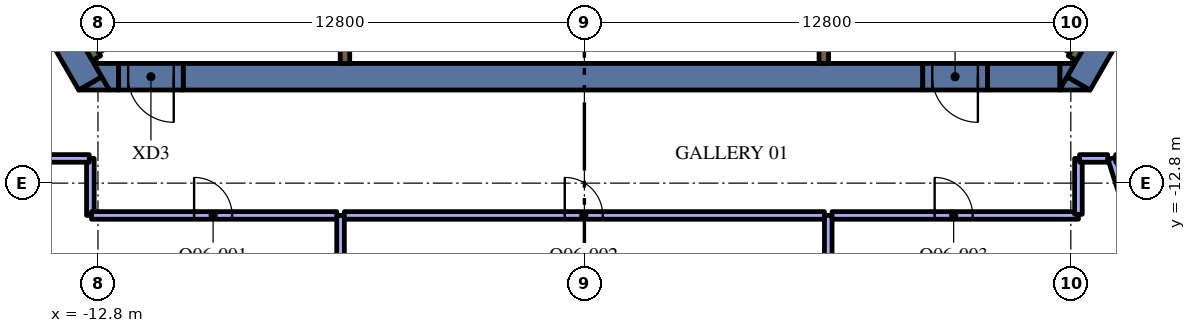
"""IFC4 building model, lengths in metres.
Left out: names, types, materials, properties, quantities, classifications, styles, units other than length and angle.
Written with IfcOpenShell. Run it as: python <this file> out.ifc"""

import sys

from ifc_helpers import new_model, si_unit, direction, frame, frame_2d, origin, place, context, subcontext, project, spatial, polyline, rectangle, outline, extrude, element, fill, save


model = new_model("IFC4")
c1 = context("Model", 3, precision=1e-05, world=origin(), true_north=direction((0.0, 1.0)))
c2 = subcontext(c1, "Body", "Model", "MODEL_VIEW")
j1 = project(units=[si_unit("LENGTHUNIT", "METRE"), si_unit("PLANEANGLEUNIT", "RADIAN")], contexts=[c1])
p1 = place(None, origin())
s1 = spatial("IfcSite", under=j1, at=p1, CompositionType="ELEMENT")
p2 = place(p1, origin())
s2 = spatial("IfcBuilding", under=s1, at=p2, CompositionType="ELEMENT")
p3 = place(p2, frame((0.0, 0.0, 205.8)))
s3 = spatial("IfcBuildingStorey", under=s2, at=p3, CompositionType="ELEMENT", Elevation=205.8)
p4 = place(p3, frame((13.003, -10.179, 0.0), z_axis=(0.0, 0.0, 1.0), x_axis=(0.499972675833, 0.866041178825, 0.0)))
e1 = element("IfcWall", 1, at=p4, inside=s3, PredefinedType="SOLIDWALL", context=c2, shape_type="SweptSolid", body=[
    extrude(rectangle(XDim=3.829, YDim=0.7, at=frame_2d((1.915, 0.0))), origin(), (0.0, 0.0, 1.0), 4.2),
])
p5 = place(p3, origin())
e2 = element("IfcWall", 2, at=p5, inside=s3, PredefinedType="SOLIDWALL", context=c2, shape_type="SweptSolid", body=[
    extrude(outline(polyline([(12.698, -10.005), (13.296, -10.35), (12.5, -10.35), (12.698, -10.005)])), origin(), (0.0, 0.0, 1.0), 4.2),
])
p6 = place(p3, frame((10.604, -10.0, 0.0), z_axis=(0.0, 0.0, 1.0), x_axis=(1.0, 0.0, 0.0)))
e3 = element("IfcWall", 3, at=p6, inside=s3, PredefinedType="SOLIDWALL", context=c2, shape_type="SweptSolid", body=[
    extrude(rectangle(XDim=1.909, YDim=0.7, at=frame_2d((0.955, 0.0))), origin(), (0.0, 0.0, 1.0), 4.2),
])
e4 = element("IfcWall", 4, at=p5, inside=s3, PredefinedType="SOLIDWALL", context=c2, shape_type="SweptSolid", body=[
    extrude(outline(polyline([(12.904, -9.65), (12.516, -10.322), (12.516, -9.65), (12.904, -9.65)])), origin(), (0.0, 0.0, 1.0), 4.2),
])
p7 = place(p3, frame((-14.917, -6.863, 0.0), z_axis=(0.0, 0.0, 1.0), x_axis=(0.499972675833, -0.866041178825, 0.0)))
e5 = element("IfcWall", 5, at=p7, inside=s3, PredefinedType="SOLIDWALL", context=c2, shape_type="SweptSolid", body=[
    extrude(rectangle(XDim=3.829, YDim=0.7, at=frame_2d((1.915, 0.0))), origin(), (0.0, 0.0, 1.0), 4.2),
])
e6 = element("IfcWall", 6, at=p5, inside=s3, PredefinedType="SOLIDWALL", context=c2, shape_type="SweptSolid", body=[
    extrude(outline(polyline([(-12.5, -10.35), (-13.296, -10.35), (-12.698, -10.005), (-12.5, -10.35)])), origin(), (0.0, 0.0, 1.0), 4.2),
])
e7 = element("IfcWall", 7, at=p5, inside=s3, PredefinedType="SOLIDWALL", context=c2, shape_type="SweptSolid", body=[
    extrude(outline(polyline([(-12.257, -10.35), (-12.5, -10.35), (-12.904, -9.65), (-12.257, -9.65), (-12.257, -10.35)])), origin(), (0.0, 0.0, 1.0), 4.2),
])
p8 = place(p3, frame((-10.556, -10.0, 0.0), z_axis=(0.0, 0.0, 1.0), x_axis=(1.0, 0.0, 0.0)))
e8 = element("IfcWall", 8, at=p8, inside=s3, PredefinedType="SOLIDWALL", context=c2, shape_type="SweptSolid", body=[
    extrude(rectangle(XDim=19.461, YDim=0.7, at=frame_2d((9.73, 0.0))), origin(), (0.0, 0.0, 1.0), 4.2),
])
p9 = place(p3, frame((12.84, -9.511, 0.0), z_axis=(0.0, 0.0, 1.0), x_axis=(0.500048121057, 0.865997619297, 0.0)))
e9 = element("IfcWall", 9, at=p9, inside=s3, PredefinedType="SOLIDWALL", context=c2, shape_type="SweptSolid", body=[
    extrude(rectangle(XDim=3.634, YDim=0.25, at=frame_2d((1.817, 0.0))), origin(), (0.0, 0.0, 1.0), 4.2),
])
p10 = place(p3, frame((12.84, -9.261, 0.0), z_axis=(0.0, 0.0, 1.0), x_axis=(-0.866013990052, 0.500019768644, 0.0)))
e10 = element("IfcWall", 10, at=p10, inside=s3, PredefinedType="SOLIDWALL", context=c2, shape_type="SweptSolid", body=[
    extrude(rectangle(XDim=6.8, YDim=0.25, at=frame_2d((3.4, 0.0))), origin(), (0.0, 0.0, 1.0), 4.2),
])
p11 = place(p3, frame((-12.84, -9.511, 0.0), z_axis=(0.0, 0.0, 1.0), x_axis=(-0.500048121057, 0.865997619297, 0.0)))
e11 = element("IfcWall", 11, at=p11, inside=s3, PredefinedType="SOLIDWALL", context=c2, shape_type="SweptSolid", body=[
    extrude(rectangle(XDim=3.634, YDim=0.25, at=frame_2d((1.817, 0.0))), origin(), (0.0, 0.0, 1.0), 4.2),
])
p12 = place(p3, frame((-12.84, -9.261, 0.0), z_axis=(0.0, 0.0, 1.0), x_axis=(0.866016039709, 0.500016218704, 0.0)))
e12 = element("IfcWall", 12, at=p12, inside=s3, PredefinedType="SOLIDWALL", context=c2, shape_type="SweptSolid", body=[
    extrude(rectangle(XDim=7.05, YDim=0.25, at=frame_2d((3.525, 0.0))), origin(), (0.0, 0.0, 1.0), 4.2),
])
p13 = place(p3, frame((-6.3, -9.052, 0.0), z_axis=(0.0, 0.0, 1.0), x_axis=(0.0, -1.0, 0.0)))
e13 = element("IfcWall", 13, at=p13, inside=s3, PredefinedType="SOLIDWALL", context=c2, shape_type="SweptSolid", body=[
    extrude(rectangle(XDim=0.598, YDim=0.25, at=frame_2d((0.299, 0.0))), origin(), (0.0, 0.0, 1.0), 4.2),
])
p14 = place(p3, frame((6.3, -9.65, 0.0), z_axis=(0.0, 0.0, 1.0), x_axis=(0.0, 1.0, 0.0)))
e14 = element("IfcWall", 14, at=p14, inside=s3, PredefinedType="SOLIDWALL", context=c2, shape_type="SweptSolid", body=[
    extrude(rectangle(XDim=1.008, YDim=0.25, at=frame_2d((0.504, 0.0))), origin(), (0.0, 0.0, 1.0), 4.2),
])
p15 = place(p3, frame((10.604, -10.0, 0.0), z_axis=(0.0, 0.0, 1.0), x_axis=(-1.0, 0.0, 0.0)))
e15 = element("IfcWall", 15, at=p15, inside=s3, PredefinedType="SOLIDWALL", context=c2, shape_type="SweptSolid", body=[
    extrude(rectangle(XDim=1.7, YDim=0.7, at=frame_2d((0.85, 0.0))), origin(), (0.0, 0.0, 1.0), 4.2),
])
p16 = place(p15, frame((0.25, 0.0, 0.0)))
e16 = element("IfcOpeningElement", 16, at=p16, cuts=e15, PredefinedType="OPENING", context=c2, shape_type="SweptSolid", body=[
    extrude(rectangle(XDim=1.2, YDim=2.1, at=frame_2d((0.6, 1.05))), frame((0.0, 0.36, 0.0), z_axis=(0.0, -1.0, 0.0), x_axis=(1.0, 0.0, 0.0)), (0.0, 0.0, 1.0), 0.72),
])
p17 = place(p3, frame((-10.556, -10.0, 0.0), z_axis=(0.0, 0.0, 1.0), x_axis=(-1.0, 0.0, 0.0)))
e17 = element("IfcWall", 17, at=p17, inside=s3, PredefinedType="SOLIDWALL", context=c2, shape_type="SweptSolid", body=[
    extrude(rectangle(XDim=1.7, YDim=0.7, at=frame_2d((0.85, 0.0))), origin(), (0.0, 0.0, 1.0), 4.2),
])
p18 = place(p17, frame((0.25, 0.0, 0.0)))
e18 = element("IfcOpeningElement", 18, at=p18, cuts=e17, PredefinedType="OPENING", context=c2, shape_type="SweptSolid", body=[
    extrude(rectangle(XDim=1.2, YDim=2.1, at=frame_2d((0.6, 1.05))), frame((0.0, 0.36, 0.0), z_axis=(0.0, -1.0, 0.0), x_axis=(1.0, 0.0, 0.0)), (0.0, 0.0, 1.0), 0.72),
])
p19 = place(p3, frame((-6.417, -13.65, 0.0), z_axis=(0.0, 0.0, 1.0), x_axis=(0.0, -1.0, 0.0)))
e19 = element("IfcWall", 19, at=p19, inside=s3, PredefinedType="PARTITIONING", context=c2, shape_type="SweptSolid", body=[
    extrude(rectangle(XDim=5.247, YDim=0.2, at=frame_2d((2.624, 0.0))), origin(), (0.0, 0.0, 1.0), 3.45),
])
p20 = place(p3, frame((-13.0, -12.15, 0.0), z_axis=(0.0, 0.0, 1.0), x_axis=(0.0, -1.0, 0.0)))
e20 = element("IfcWall", 20, at=p20, inside=s3, PredefinedType="PARTITIONING", context=c2, shape_type="SweptSolid", body=[
    extrude(rectangle(XDim=1.5, YDim=0.2, at=frame_2d((0.75, 0.0))), origin(), (0.0, 0.0, 1.0), 3.45),
])
p21 = place(p3, frame((-12.97, -13.65, 0.0), z_axis=(0.0, 0.0, 1.0), x_axis=(1.0, 0.0, 0.0)))
e21 = element("IfcWall", 21, at=p21, inside=s3, PredefinedType="PARTITIONING", context=c2, shape_type="SweptSolid", body=[
    extrude(rectangle(XDim=6.453, YDim=0.2, at=frame_2d((3.227, 0.0))), origin(), (0.0, 0.0, 1.0), 3.45),
])
p22 = place(p21, frame((2.7, 0.0, 0.0)))
e22 = element("IfcOpeningElement", 22, at=p22, cuts=e21, PredefinedType="OPENING", context=c2, shape_type="SweptSolid", body=[
    extrude(rectangle(XDim=1.0, YDim=2.1, at=frame_2d((0.5, 1.05))), frame((0.0, 0.11, 0.0), z_axis=(0.0, -1.0, 0.0), x_axis=(1.0, 0.0, 0.0)), (0.0, 0.0, 1.0), 0.22),
])
p23 = place(p3, frame((-14.347, -12.15, 0.0), z_axis=(0.0, 0.0, 1.0), x_axis=(1.0, 0.0, 0.0)))
e23 = element("IfcWall", 23, at=p23, inside=s3, PredefinedType="PARTITIONING", context=c2, shape_type="SweptSolid", body=[
    extrude(rectangle(XDim=1.317, YDim=0.2, at=frame_2d((0.659, 0.0))), origin(), (0.0, 0.0, 1.0), 3.45),
])
p24 = place(p3, frame((6.417, -13.65, 0.0), z_axis=(0.0, 0.0, 1.0), x_axis=(0.0, -1.0, 0.0)))
e24 = element("IfcWall", 24, at=p24, inside=s3, PredefinedType="PARTITIONING", context=c2, shape_type="SweptSolid", body=[
    extrude(rectangle(XDim=5.247, YDim=0.2, at=frame_2d((2.624, 0.0))), origin(), (0.0, 0.0, 1.0), 3.45),
])
p25 = place(p3, frame((-6.317, -13.65, 0.0), z_axis=(0.0, 0.0, 1.0), x_axis=(1.0, 0.0, 0.0)))
e25 = element("IfcWall", 25, at=p25, inside=s3, PredefinedType="PARTITIONING", context=c2, shape_type="SweptSolid", body=[
    extrude(rectangle(XDim=12.634, YDim=0.2, at=frame_2d((6.317, 0.0))), origin(), (0.0, 0.0, 1.0), 3.45),
])
p26 = place(p25, frame((5.8, 0.0, 0.0)))
e26 = element("IfcOpeningElement", 26, at=p26, cuts=e25, PredefinedType="OPENING", context=c2, shape_type="SweptSolid", body=[
    extrude(rectangle(XDim=1.0, YDim=2.1, at=frame_2d((0.5, 1.05))), frame((0.0, 0.11, 0.0), z_axis=(0.0, -1.0, 0.0), x_axis=(1.0, 0.0, 0.0)), (0.0, 0.0, 1.0), 0.22),
])
p27 = place(p3, frame((13.875, -12.15, 0.0), z_axis=(0.0, 0.0, 1.0), x_axis=(0.3005606746, -0.953762696316, 0.0)))
e27 = element("IfcWall", 27, at=p27, inside=s3, PredefinedType="PARTITIONING", context=c2, shape_type="SweptSolid", body=[
    extrude(rectangle(XDim=6.9, YDim=0.2, at=frame_2d((3.45, 0.0))), origin(), (0.0, 0.0, 1.0), 3.45),
])
p28 = place(p3, frame((6.517, -13.65, 0.0), z_axis=(0.0, 0.0, 1.0), x_axis=(1.0, 0.0, 0.0)))
e28 = element("IfcWall", 28, at=p28, inside=s3, PredefinedType="PARTITIONING", context=c2, shape_type="SweptSolid", body=[
    extrude(rectangle(XDim=6.483, YDim=0.2, at=frame_2d((3.242, 0.0))), origin(), (0.0, 0.0, 1.0), 3.45),
])
p29 = place(p28, frame((2.7, 0.0, 0.0)))
e29 = element("IfcOpeningElement", 29, at=p29, cuts=e28, PredefinedType="OPENING", context=c2, shape_type="SweptSolid", body=[
    extrude(rectangle(XDim=1.0, YDim=2.1, at=frame_2d((0.5, 1.05))), frame((0.0, 0.11, 0.0), z_axis=(0.0, -1.0, 0.0), x_axis=(1.0, 0.0, 0.0)), (0.0, 0.0, 1.0), 0.22),
])
p30 = place(p3, frame((13.0, -13.62, 0.0), z_axis=(0.0, 0.0, 1.0), x_axis=(0.0, 1.0, 0.0)))
e30 = element("IfcWall", 30, at=p30, inside=s3, PredefinedType="PARTITIONING", context=c2, shape_type="SweptSolid", body=[
    extrude(rectangle(XDim=1.47, YDim=0.2, at=frame_2d((0.735, 0.0))), origin(), (0.0, 0.0, 1.0), 3.45),
])
p31 = place(p3, frame((13.03, -12.15, 0.0), z_axis=(0.0, 0.0, 1.0), x_axis=(1.0, 0.0, 0.0)))
e31 = element("IfcWall", 31, at=p31, inside=s3, PredefinedType="PARTITIONING", context=c2, shape_type="SweptSolid", body=[
    extrude(rectangle(XDim=0.74, YDim=0.2, at=frame_2d((0.37, 0.0))), origin(), (0.0, 0.0, 1.0), 3.45),
])
p32 = place(p3, frame((13.98, -12.15, 0.0), z_axis=(0.0, 0.0, 1.0), x_axis=(1.0, 0.0, 0.0)))
e32 = element("IfcWall", 32, at=p32, inside=s3, PredefinedType="PARTITIONING", context=c2, shape_type="SweptSolid", body=[
    extrude(rectangle(XDim=0.367, YDim=0.2, at=frame_2d((0.184, 0.0))), origin(), (0.0, 0.0, 1.0), 3.45),
])
p33 = place(p16, origin())
e33 = element("IfcDoor", 33, at=p33, inside=s3, OperationType="SINGLE_SWING_LEFT", PredefinedType="DOOR", context=c2, shape_type="SweptSolid", body=[
    extrude(rectangle(XDim=1.2, YDim=2.1, at=frame_2d((0.6, 1.05))), frame((0.0, 0.025, 0.0), z_axis=(0.0, -1.0, 0.0), x_axis=(1.0, 0.0, 0.0)), (0.0, 0.0, 1.0), 0.05),
])
fill(e16, e33)
p34 = place(p18, origin())
e34 = element("IfcDoor", 34, at=p34, inside=s3, OperationType="SINGLE_SWING_LEFT", PredefinedType="DOOR", context=c2, shape_type="SweptSolid", body=[
    extrude(rectangle(XDim=1.2, YDim=2.1, at=frame_2d((0.6, 1.05))), frame((0.0, 0.025, 0.0), z_axis=(0.0, -1.0, 0.0), x_axis=(1.0, 0.0, 0.0)), (0.0, 0.0, 1.0), 0.05),
])
fill(e18, e34)
p35 = place(p22, origin())
e35 = element("IfcDoor", 35, at=p35, inside=s3, OperationType="SINGLE_SWING_LEFT", PredefinedType="DOOR", context=c2, shape_type="SweptSolid", body=[
    extrude(rectangle(XDim=1.0, YDim=2.1, at=frame_2d((0.5, 1.05))), frame((0.0, 0.025, 0.0), z_axis=(0.0, -1.0, 0.0), x_axis=(1.0, 0.0, 0.0)), (0.0, 0.0, 1.0), 0.05),
])
fill(e22, e35)
p36 = place(p26, origin())
e36 = element("IfcDoor", 36, at=p36, inside=s3, OperationType="SINGLE_SWING_LEFT", PredefinedType="DOOR", context=c2, shape_type="SweptSolid", body=[
    extrude(rectangle(XDim=1.0, YDim=2.1, at=frame_2d((0.5, 1.05))), frame((0.0, 0.025, 0.0), z_axis=(0.0, -1.0, 0.0), x_axis=(1.0, 0.0, 0.0)), (0.0, 0.0, 1.0), 0.05),
])
fill(e26, e36)
p37 = place(p29, origin())
e37 = element("IfcDoor", 37, at=p37, inside=s3, OperationType="SINGLE_SWING_LEFT", PredefinedType="DOOR", context=c2, shape_type="SweptSolid", body=[
    extrude(rectangle(XDim=1.0, YDim=2.1, at=frame_2d((0.5, 1.05))), frame((0.0, 0.025, 0.0), z_axis=(0.0, -1.0, 0.0), x_axis=(1.0, 0.0, 0.0)), (0.0, 0.0, 1.0), 0.05),
])
fill(e29, e37)
save(model, sys.argv[1])
